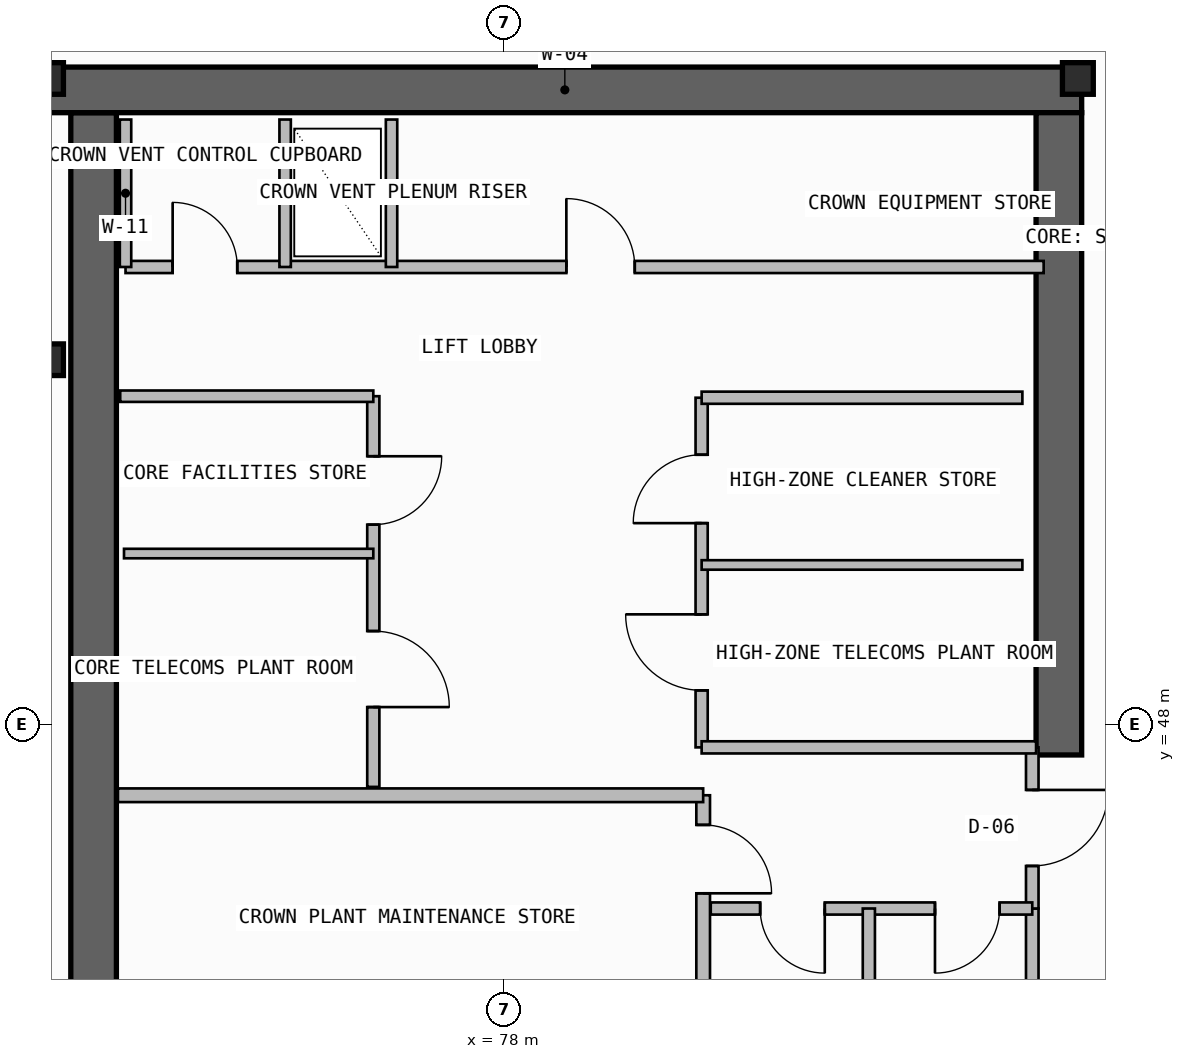
"""IFC4 building model, lengths in metres.
Left out: names, types, materials, properties, quantities, classifications, styles, units other than length and angle.
Written with IfcOpenShell. Run it as: python <this file> out.ifc"""

import sys

from ifc_helpers import new_model, si_unit, direction, frame, frame_2d, origin, origin_2d, place, context, subcontext, project, spatial, rectangle, i_section, extrude, element, fill, save


model = new_model("IFC4")
c1 = context("Model", 3, precision=1e-05, world=origin(), true_north=direction((0.0, 1.0)))
c2 = subcontext(c1, "Body", "Model", "MODEL_VIEW")
j1 = project(units=[si_unit("LENGTHUNIT", "METRE"), si_unit("PLANEANGLEUNIT", "RADIAN")], contexts=[c1])
p1 = place(None, origin())
s1 = spatial("IfcSite", under=j1, at=p1, CompositionType="ELEMENT")
p2 = place(p1, origin())
s2 = spatial("IfcBuilding", under=s1, at=p2, CompositionType="ELEMENT")
p3 = place(p2, frame((0.0, 0.0, 307.78)))
s3 = spatial("IfcBuildingStorey", under=s2, at=p3, CompositionType="ELEMENT", Elevation=307.78)
p4 = place(p3, frame((72.6, 43.35, -0.2), z_axis=(0.0, 0.0, 1.0), x_axis=(0.0, 1.0, 0.0)))
e1 = element("IfcWall", 1, at=p4, inside=s3, PredefinedType="SHEAR", context=c2, shape_type="SweptSolid", body=[
    extrude(rectangle(XDim=12.7, YDim=0.6, at=frame_2d((6.35, 0.0))), origin(), (0.0, 0.0, 1.0), 4.8),
])
p5 = place(p3, frame((72.0, 56.35, -0.2), z_axis=(0.0, 0.0, 1.0), x_axis=(1.0, 0.0, 0.0)))
e2 = element("IfcWall", 2, at=p5, inside=s3, PredefinedType="SHEAR", context=c2, shape_type="SweptSolid", body=[
    extrude(rectangle(XDim=13.6, YDim=0.6, at=frame_2d((6.8, 0.0))), origin(), (0.0, 0.0, 1.0), 4.8),
])
p6 = place(p3, frame((85.3, 47.6, -0.2), z_axis=(0.0, 0.0, 1.0), x_axis=(0.0, 1.0, 0.0)))
e3 = element("IfcWall", 3, at=p6, inside=s3, PredefinedType="SHEAR", context=c2, shape_type="SweptSolid", body=[
    extrude(rectangle(XDim=8.45, YDim=0.6, at=frame_2d((4.225, 0.0))), origin(), (0.0, 0.0, 1.0), 4.8),
])
for number, where, z_axis, x_axis in (
    (4, (72.0, 52.8, 0.0), (0.0, 0.0, 1.0), (1.0, 0.0, 0.0)),
    (5, (72.0, 56.5, 0.0), (0.0, 0.0, 1.0), (1.0, 0.0, 0.0)),
    (6, (85.55, 56.5, 0.0), (0.0, 0.0, 1.0), (1.0, 0.0, 0.0)),
):
    element("IfcColumn", number, at=place(p3, frame(where, z_axis=z_axis, x_axis=x_axis)), inside=s3, PredefinedType="COLUMN", context=c2, shape_type="SweptSolid", body=[
        extrude(i_section(OverallWidth=0.406, OverallDepth=0.416, WebThickness=0.03, FlangeThickness=0.048, FilletRadius=0.015, at=origin_2d()), origin(), (0.0, 0.0, 1.0), 4.8),
    ])
p7 = place(p3, frame((80.62, 43.83, 0.0), z_axis=(0.0, 0.0, 1.0), x_axis=(0.0, 1.0, 0.0)))
e7 = element("IfcWall", 7, at=p7, inside=s3, PredefinedType="PLUMBINGWALL", context=c2, shape_type="SweptSolid", body=[
    extrude(rectangle(XDim=3.24, YDim=0.18, at=frame_2d((1.62, 0.0))), origin(), (0.0, 0.0, 1.0), 4.6),
])
p8 = place(p7, frame((1.95, 0.0, 0.0)))
e8 = element("IfcOpeningElement", 8, at=p8, cuts=e7, PredefinedType="OPENING", context=c2, shape_type="SweptSolid", body=[
    extrude(rectangle(XDim=0.9, YDim=2.1, at=frame_2d((0.45, 1.05))), frame((0.0, 0.1, 0.0), z_axis=(0.0, -1.0, 0.0), x_axis=(1.0, 0.0, 0.0)), (0.0, 0.0, 1.0), 0.2),
])
p9 = place(p3, frame((72.92, 47.07, 0.0), z_axis=(0.0, 0.0, 1.0), x_axis=(1.0, 0.0, 0.0)))
e9 = element("IfcWall", 9, at=p9, inside=s3, PredefinedType="PLUMBINGWALL", context=c2, shape_type="SweptSolid", body=[
    extrude(rectangle(XDim=7.7, YDim=0.18, at=frame_2d((3.85, 0.0))), origin(), (0.0, 0.0, 1.0), 4.6),
])
p10 = place(p3, frame((84.95, 43.68, 0.0), z_axis=(0.0, 0.0, 1.0), x_axis=(0.0, 1.0, 0.0)))
e10 = element("IfcWall", 10, at=p10, inside=s3, PredefinedType="PLUMBINGWALL", context=c2, shape_type="SweptSolid", body=[
    extrude(rectangle(XDim=1.9, YDim=0.165, at=frame_2d((0.95, 0.0))), origin(), (0.0, 0.0, 1.0), 4.6),
])
p11 = place(p3, frame((84.95, 45.58, 0.0), z_axis=(0.0, 0.0, 1.0), x_axis=(0.0, 1.0, 0.0)))
e11 = element("IfcWall", 11, at=p11, inside=s3, PredefinedType="PARTITIONING", context=c2, shape_type="SweptSolid", body=[
    extrude(rectangle(XDim=2.12, YDim=0.165, at=frame_2d((1.06, 0.0))), origin(), (0.0, 0.0, 1.0), 4.6),
])
p12 = place(p11, frame((0.56, 0.0, 0.0)))
e12 = element("IfcOpeningElement", 12, at=p12, cuts=e11, PredefinedType="OPENING", context=c2, shape_type="SweptSolid", body=[
    extrude(rectangle(XDim=1.0, YDim=2.2, at=frame_2d((0.5, 1.1))), frame((0.0, 0.093, 0.0), z_axis=(0.0, -1.0, 0.0), x_axis=(1.0, 0.0, 0.0)), (0.0, 0.0, 1.0), 0.185),
])
p13 = place(p3, frame((80.72, 45.58, 0.0), z_axis=(0.0, 0.0, 1.0), x_axis=(1.0, 0.0, 0.0)))
e13 = element("IfcWall", 13, at=p13, inside=s3, PredefinedType="PLUMBINGWALL", context=c2, shape_type="SweptSolid", body=[
    extrude(rectangle(XDim=4.23, YDim=0.16, at=frame_2d((2.115, 0.0))), origin(), (0.0, 0.0, 1.0), 4.6),
])
p14 = place(p13, frame((0.65, 0.0, 0.0)))
e14 = element("IfcOpeningElement", 14, at=p14, cuts=e13, PredefinedType="OPENING", context=c2, shape_type="SweptSolid", body=[
    extrude(rectangle(XDim=0.85, YDim=2.05, at=frame_2d((0.425, 1.025))), frame((0.0, 0.09, 0.0), z_axis=(0.0, -1.0, 0.0), x_axis=(1.0, 0.0, 0.0)), (0.0, 0.0, 1.0), 0.18),
])
p15 = place(p13, frame((2.95, 0.0, 0.0)))
e15 = element("IfcOpeningElement", 15, at=p15, cuts=e13, PredefinedType="OPENING", context=c2, shape_type="SweptSolid", body=[
    extrude(rectangle(XDim=0.85, YDim=2.05, at=frame_2d((0.425, 1.025))), frame((0.0, 0.09, 0.0), z_axis=(0.0, -1.0, 0.0), x_axis=(1.0, 0.0, 0.0)), (0.0, 0.0, 1.0), 0.18),
])
p16 = place(p3, frame((82.8, 43.68, 0.0), z_axis=(0.0, 0.0, 1.0), x_axis=(0.0, 1.0, 0.0)))
e16 = element("IfcWall", 16, at=p16, inside=s3, PredefinedType="PLUMBINGWALL", context=c2, shape_type="SweptSolid", body=[
    extrude(rectangle(XDim=1.9, YDim=0.16, at=frame_2d((0.95, 0.0))), origin(), (0.0, 0.0, 1.0), 4.6),
])
p17 = place(p3, frame((76.28, 47.18, 0.0), z_axis=(0.0, 0.0, 1.0), x_axis=(0.0, 1.0, 0.0)))
e17 = element("IfcWall", 17, at=p17, inside=s3, PredefinedType="SOLIDWALL", context=c2, shape_type="SweptSolid", body=[
    extrude(rectangle(XDim=5.14, YDim=0.16, at=frame_2d((2.57, 0.0))), origin(), (0.0, 0.0, 1.0), 4.6),
])
p18 = place(p17, frame((1.05, 0.0, 0.0)))
e18 = element("IfcOpeningElement", 18, at=p18, cuts=e17, PredefinedType="OPENING", context=c2, shape_type="SweptSolid", body=[
    extrude(rectangle(XDim=1.0, YDim=2.2, at=frame_2d((0.5, 1.1))), frame((0.0, 0.09, 0.0), z_axis=(0.0, -1.0, 0.0), x_axis=(1.0, 0.0, 0.0)), (0.0, 0.0, 1.0), 0.18),
])
p19 = place(p17, frame((3.45, 0.0, 0.0)))
e19 = element("IfcOpeningElement", 19, at=p19, cuts=e17, PredefinedType="OPENING", context=c2, shape_type="SweptSolid", body=[
    extrude(rectangle(XDim=0.9, YDim=2.1, at=frame_2d((0.45, 1.05))), frame((0.0, 0.09, 0.0), z_axis=(0.0, -1.0, 0.0), x_axis=(1.0, 0.0, 0.0)), (0.0, 0.0, 1.0), 0.18),
])
p20 = place(p3, frame((72.95, 52.32, 0.0), z_axis=(0.0, 0.0, 1.0), x_axis=(1.0, 0.0, 0.0)))
e20 = element("IfcWall", 20, at=p20, inside=s3, PredefinedType="SOLIDWALL", context=c2, shape_type="SweptSolid", body=[
    extrude(rectangle(XDim=3.33, YDim=0.15, at=frame_2d((1.665, 0.0))), origin(), (0.0, 0.0, 1.0), 4.6),
])
p21 = place(p3, frame((73.0, 50.25, 0.0), z_axis=(0.0, 0.0, 1.0), x_axis=(1.0, 0.0, 0.0)))
e21 = element("IfcWall", 21, at=p21, inside=s3, PredefinedType="PARTITIONING", context=c2, shape_type="SweptSolid", body=[
    extrude(rectangle(XDim=3.28, YDim=0.125, at=frame_2d((1.64, 0.0))), origin(), (0.0, 0.0, 1.0), 4.6),
])
p22 = place(p3, frame((80.6, 47.7, 0.0), z_axis=(0.0, 0.0, 1.0), x_axis=(0.0, 1.0, 0.0)))
e22 = element("IfcWall", 22, at=p22, inside=s3, PredefinedType="SOLIDWALL", context=c2, shape_type="SweptSolid", body=[
    extrude(rectangle(XDim=4.6, YDim=0.16, at=frame_2d((2.3, 0.0))), origin(), (0.0, 0.0, 1.0), 4.6),
])
p23 = place(p22, frame((0.75, 0.0, 0.0)))
e23 = element("IfcOpeningElement", 23, at=p23, cuts=e22, PredefinedType="OPENING", context=c2, shape_type="SweptSolid", body=[
    extrude(rectangle(XDim=1.0, YDim=2.2, at=frame_2d((0.5, 1.1))), frame((0.0, 0.09, 0.0), z_axis=(0.0, -1.0, 0.0), x_axis=(1.0, 0.0, 0.0)), (0.0, 0.0, 1.0), 0.18),
])
p24 = place(p22, frame((2.95, 0.0, 0.0)))
e24 = element("IfcOpeningElement", 24, at=p24, cuts=e22, PredefinedType="OPENING", context=c2, shape_type="SweptSolid", body=[
    extrude(rectangle(XDim=0.9, YDim=2.1, at=frame_2d((0.45, 1.05))), frame((0.0, 0.09, 0.0), z_axis=(0.0, -1.0, 0.0), x_axis=(1.0, 0.0, 0.0)), (0.0, 0.0, 1.0), 0.18),
])
p25 = place(p3, frame((80.6, 47.7, 0.0), z_axis=(0.0, 0.0, 1.0), x_axis=(1.0, 0.0, 0.0)))
e25 = element("IfcWall", 25, at=p25, inside=s3, PredefinedType="SOLIDWALL", context=c2, shape_type="SweptSolid", body=[
    extrude(rectangle(XDim=4.4, YDim=0.16, at=frame_2d((2.2, 0.0))), origin(), (0.0, 0.0, 1.0), 4.6),
])
p26 = place(p3, frame((80.6, 52.3, 0.0), z_axis=(0.0, 0.0, 1.0), x_axis=(1.0, 0.0, 0.0)))
e26 = element("IfcWall", 26, at=p26, inside=s3, PredefinedType="SOLIDWALL", context=c2, shape_type="SweptSolid", body=[
    extrude(rectangle(XDim=4.22, YDim=0.16, at=frame_2d((2.11, 0.0))), origin(), (0.0, 0.0, 1.0), 4.6),
])
p27 = place(p3, frame((80.6, 50.1, 0.0), z_axis=(0.0, 0.0, 1.0), x_axis=(1.0, 0.0, 0.0)))
e27 = element("IfcWall", 27, at=p27, inside=s3, PredefinedType="PARTITIONING", context=c2, shape_type="SweptSolid", body=[
    extrude(rectangle(XDim=4.22, YDim=0.125, at=frame_2d((2.11, 0.0))), origin(), (0.0, 0.0, 1.0), 4.6),
])
p28 = place(p3, frame((73.02, 54.02, 0.0), z_axis=(0.0, 0.0, 1.0), x_axis=(1.0, 0.0, 0.0)))
e28 = element("IfcWall", 28, at=p28, inside=s3, PredefinedType="SOLIDWALL", context=c2, shape_type="SweptSolid", body=[
    extrude(rectangle(XDim=12.08, YDim=0.16, at=frame_2d((6.04, 0.0))), origin(), (0.0, 0.0, 1.0), 4.6),
])
p29 = place(p28, frame((0.62, 0.0, 0.0)))
e29 = element("IfcOpeningElement", 29, at=p29, cuts=e28, PredefinedType="OPENING", context=c2, shape_type="SweptSolid", body=[
    extrude(rectangle(XDim=0.85, YDim=2.05, at=frame_2d((0.425, 1.025))), frame((0.0, 0.09, 0.0), z_axis=(0.0, -1.0, 0.0), x_axis=(1.0, 0.0, 0.0)), (0.0, 0.0, 1.0), 0.18),
])
p30 = place(p28, frame((5.8, 0.0, 0.0)))
e30 = element("IfcOpeningElement", 30, at=p30, cuts=e28, PredefinedType="OPENING", context=c2, shape_type="SweptSolid", body=[
    extrude(rectangle(XDim=0.9, YDim=2.1, at=frame_2d((0.45, 1.05))), frame((0.0, 0.09, 0.0), z_axis=(0.0, -1.0, 0.0), x_axis=(1.0, 0.0, 0.0)), (0.0, 0.0, 1.0), 0.18),
])
for number, where, z_axis, x_axis in (
    (31, (73.02, 54.02, 0.0), (0.0, 0.0, 1.0), (0.0, 1.0, 0.0)),
    (32, (75.12, 54.02, 0.0), (0.0, 0.0, 1.0), (0.0, 1.0, 0.0)),
    (33, (76.52, 54.02, 0.0), (0.0, 0.0, 1.0), (0.0, 1.0, 0.0)),
):
    element("IfcWall", number, at=place(p3, frame(where, z_axis=z_axis, x_axis=x_axis)), inside=s3, PredefinedType="PLUMBINGWALL", context=c2, shape_type="SweptSolid", body=[
        extrude(rectangle(XDim=1.94, YDim=0.15, at=frame_2d((0.97, 0.0))), origin(), (0.0, 0.0, 1.0), 4.6),
    ])
p31 = place(p8, frame((0.9, 0.0, 0.0), z_axis=(0.0, 0.0, 1.0), x_axis=(-1.0, 0.0, 0.0)))
e34 = element("IfcDoor", 34, at=p31, inside=s3, OperationType="SINGLE_SWING_RIGHT", PredefinedType="DOOR", context=c2, shape_type="SweptSolid", body=[
    extrude(rectangle(XDim=0.9, YDim=2.1, at=frame_2d((0.45, 1.05))), frame((0.0, 0.025, 0.0), z_axis=(0.0, -1.0, 0.0), x_axis=(1.0, 0.0, 0.0)), (0.0, 0.0, 1.0), 0.05),
])
fill(e8, e34)
p32 = place(p12, frame((1.0, 0.0, 0.0), z_axis=(0.0, 0.0, 1.0), x_axis=(-1.0, 0.0, 0.0)))
e35 = element("IfcDoor", 35, at=p32, inside=s3, OperationType="SINGLE_SWING_LEFT", PredefinedType="DOOR", context=c2, shape_type="SweptSolid", body=[
    extrude(rectangle(XDim=1.0, YDim=2.2, at=frame_2d((0.5, 1.1))), frame((0.0, 0.025, 0.0), z_axis=(0.0, -1.0, 0.0), x_axis=(1.0, 0.0, 0.0)), (0.0, 0.0, 1.0), 0.05),
])
fill(e12, e35)
p33 = place(p14, frame((0.85, 0.0, 0.0), z_axis=(0.0, 0.0, 1.0), x_axis=(-1.0, 0.0, 0.0)))
e36 = element("IfcDoor", 36, at=p33, inside=s3, OperationType="SINGLE_SWING_LEFT", PredefinedType="DOOR", context=c2, shape_type="SweptSolid", body=[
    extrude(rectangle(XDim=0.85, YDim=2.05, at=frame_2d((0.425, 1.025))), frame((0.0, 0.025, 0.0), z_axis=(0.0, -1.0, 0.0), x_axis=(1.0, 0.0, 0.0)), (0.0, 0.0, 1.0), 0.05),
])
fill(e14, e36)
p34 = place(p15, frame((0.85, 0.0, 0.0), z_axis=(0.0, 0.0, 1.0), x_axis=(-1.0, 0.0, 0.0)))
e37 = element("IfcDoor", 37, at=p34, inside=s3, OperationType="SINGLE_SWING_RIGHT", PredefinedType="DOOR", context=c2, shape_type="SweptSolid", body=[
    extrude(rectangle(XDim=0.85, YDim=2.05, at=frame_2d((0.425, 1.025))), frame((0.0, 0.025, 0.0), z_axis=(0.0, -1.0, 0.0), x_axis=(1.0, 0.0, 0.0)), (0.0, 0.0, 1.0), 0.05),
])
fill(e15, e37)
p35 = place(p18, frame((1.0, 0.0, 0.0), z_axis=(0.0, 0.0, 1.0), x_axis=(-1.0, 0.0, 0.0)))
e38 = element("IfcDoor", 38, at=p35, inside=s3, OperationType="SINGLE_SWING_RIGHT", PredefinedType="DOOR", context=c2, shape_type="SweptSolid", body=[
    extrude(rectangle(XDim=1.0, YDim=2.2, at=frame_2d((0.5, 1.1))), frame((0.0, 0.025, 0.0), z_axis=(0.0, -1.0, 0.0), x_axis=(1.0, 0.0, 0.0)), (0.0, 0.0, 1.0), 0.05),
])
fill(e18, e38)
p36 = place(p19, frame((0.9, 0.0, 0.0), z_axis=(0.0, 0.0, 1.0), x_axis=(-1.0, 0.0, 0.0)))
e39 = element("IfcDoor", 39, at=p36, inside=s3, OperationType="SINGLE_SWING_LEFT", PredefinedType="DOOR", context=c2, shape_type="SweptSolid", body=[
    extrude(rectangle(XDim=0.9, YDim=2.1, at=frame_2d((0.45, 1.05))), frame((0.0, 0.025, 0.0), z_axis=(0.0, -1.0, 0.0), x_axis=(1.0, 0.0, 0.0)), (0.0, 0.0, 1.0), 0.05),
])
fill(e19, e39)
p37 = place(p23, origin())
e40 = element("IfcDoor", 40, at=p37, inside=s3, OperationType="SINGLE_SWING_RIGHT", PredefinedType="DOOR", context=c2, shape_type="SweptSolid", body=[
    extrude(rectangle(XDim=1.0, YDim=2.2, at=frame_2d((0.5, 1.1))), frame((0.0, 0.025, 0.0), z_axis=(0.0, -1.0, 0.0), x_axis=(1.0, 0.0, 0.0)), (0.0, 0.0, 1.0), 0.05),
])
fill(e23, e40)
p38 = place(p24, origin())
e41 = element("IfcDoor", 41, at=p38, inside=s3, OperationType="SINGLE_SWING_LEFT", PredefinedType="DOOR", context=c2, shape_type="SweptSolid", body=[
    extrude(rectangle(XDim=0.9, YDim=2.1, at=frame_2d((0.45, 1.05))), frame((0.0, 0.025, 0.0), z_axis=(0.0, -1.0, 0.0), x_axis=(1.0, 0.0, 0.0)), (0.0, 0.0, 1.0), 0.05),
])
fill(e24, e41)
p39 = place(p29, origin())
e42 = element("IfcDoor", 42, at=p39, inside=s3, OperationType="SINGLE_SWING_LEFT", PredefinedType="DOOR", context=c2, shape_type="SweptSolid", body=[
    extrude(rectangle(XDim=0.85, YDim=2.05, at=frame_2d((0.425, 1.025))), frame((0.0, 0.025, 0.0), z_axis=(0.0, -1.0, 0.0), x_axis=(1.0, 0.0, 0.0)), (0.0, 0.0, 1.0), 0.05),
])
fill(e29, e42)
p40 = place(p30, origin())
e43 = element("IfcDoor", 43, at=p40, inside=s3, OperationType="SINGLE_SWING_LEFT", PredefinedType="DOOR", context=c2, shape_type="SweptSolid", body=[
    extrude(rectangle(XDim=0.9, YDim=2.1, at=frame_2d((0.45, 1.05))), frame((0.0, 0.025, 0.0), z_axis=(0.0, -1.0, 0.0), x_axis=(1.0, 0.0, 0.0)), (0.0, 0.0, 1.0), 0.05),
])
fill(e30, e43)
save(model, sys.argv[1])
